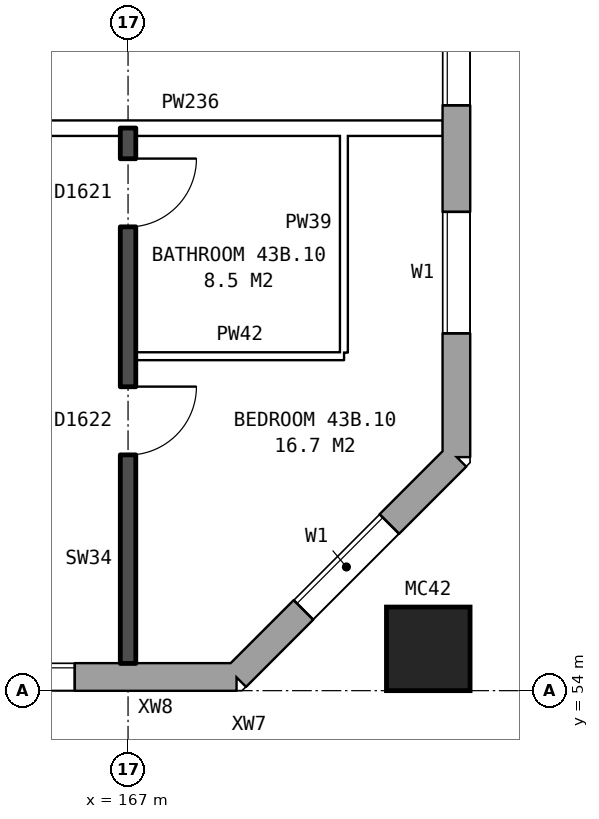
"""IFC4 building model, lengths in metres.
Left out: names, types, materials, properties, quantities, classifications, styles, units other than length and angle.
Written with IfcOpenShell. Run it as: python <this file> out.ifc"""

import sys

from ifc_helpers import new_model, si_unit, direction, frame, frame_2d, origin, origin_2d, place, context, subcontext, project, spatial, rectangle, hollow_rectangle, extrude, element, fill, save


model = new_model("IFC4")
c1 = context("Model", 3, precision=1e-05, world=origin(), true_north=direction((0.0, 1.0)))
c2 = subcontext(c1, "Body", "Model", "MODEL_VIEW")
j1 = project(units=[si_unit("LENGTHUNIT", "METRE"), si_unit("PLANEANGLEUNIT", "RADIAN")], contexts=[c1])
p1 = place(None, origin())
s1 = spatial("IfcSite", under=j1, at=p1, CompositionType="ELEMENT")
p2 = place(p1, origin())
s2 = spatial("IfcBuilding", under=s1, at=p2, CompositionType="ELEMENT")
p3 = place(p2, frame((0.0, 0.0, 154.7)))
s3 = spatial("IfcBuildingStorey", under=s2, at=p3, CompositionType="ELEMENT", Elevation=154.7)
p4 = place(p3, frame((170.95, 54.55, 0.0), z_axis=(0.0, 0.0, 1.0), x_axis=(1.0, 0.0, 0.0)))
e1 = element("IfcColumn", 1, at=p4, inside=s3, PredefinedType="COLUMN", context=c2, shape_type="SweptSolid", body=[
    extrude(hollow_rectangle(XDim=1.1, YDim=1.1, WallThickness=0.06, at=origin_2d()), origin(), (0.0, 0.0, 1.0), 3.1),
])
p5 = place(p3, frame((134.075, 54.18, 0.0), z_axis=(0.0, 0.0, 1.0), x_axis=(1.0, 0.0, 0.0)))
e2 = element("IfcWall", 2, at=p5, inside=s3, PredefinedType="STANDARD", context=c2, shape_type="SweptSolid", body=[
    extrude(rectangle(XDim=34.351, YDim=0.36, at=frame_2d((17.175, 0.0))), origin(), (0.0, 0.0, 1.0), 2.85),
])
p6 = place(p5, frame((0.625, 0.0, 0.8)))
e3 = element("IfcOpeningElement", 3, at=p6, cuts=e2, PredefinedType="OPENING", context=c2, shape_type="SweptSolid", body=[
    extrude(rectangle(XDim=1.6, YDim=1.8, at=frame_2d((0.8, 0.9))), frame((0.0, 0.19, 0.0), z_axis=(0.0, -1.0, 0.0), x_axis=(1.0, 0.0, 0.0)), (0.0, 0.0, 1.0), 0.38),
])
p7 = place(p5, frame((3.125, 0.0, 0.8)))
e4 = element("IfcOpeningElement", 4, at=p7, cuts=e2, PredefinedType="OPENING", context=c2, shape_type="SweptSolid", body=[
    extrude(rectangle(XDim=1.2, YDim=1.8, at=frame_2d((0.6, 0.9))), frame((0.0, 0.19, 0.0), z_axis=(0.0, -1.0, 0.0), x_axis=(1.0, 0.0, 0.0)), (0.0, 0.0, 1.0), 0.38),
])
p8 = place(p5, frame((4.625, 0.0, 1.7)))
e5 = element("IfcOpeningElement", 5, at=p8, cuts=e2, PredefinedType="OPENING", context=c2, shape_type="SweptSolid", body=[
    extrude(rectangle(XDim=0.8, YDim=0.9, at=frame_2d((0.4, 0.45))), frame((0.0, 0.19, 0.0), z_axis=(0.0, -1.0, 0.0), x_axis=(1.0, 0.0, 0.0)), (0.0, 0.0, 1.0), 0.38),
])
p9 = place(p5, frame((9.625, 0.0, 0.8)))
e6 = element("IfcOpeningElement", 6, at=p9, cuts=e2, PredefinedType="OPENING", context=c2, shape_type="SweptSolid", body=[
    extrude(rectangle(XDim=1.6, YDim=1.8, at=frame_2d((0.8, 0.9))), frame((0.0, 0.19, 0.0), z_axis=(0.0, -1.0, 0.0), x_axis=(1.0, 0.0, 0.0)), (0.0, 0.0, 1.0), 0.38),
])
p10 = place(p5, frame((12.625, 0.0, 0.8)))
e7 = element("IfcOpeningElement", 7, at=p10, cuts=e2, PredefinedType="OPENING", context=c2, shape_type="SweptSolid", body=[
    extrude(rectangle(XDim=1.6, YDim=1.8, at=frame_2d((0.8, 0.9))), frame((0.0, 0.19, 0.0), z_axis=(0.0, -1.0, 0.0), x_axis=(1.0, 0.0, 0.0)), (0.0, 0.0, 1.0), 0.38),
])
p11 = place(p5, frame((15.625, 0.0, 0.8)))
e8 = element("IfcOpeningElement", 8, at=p11, cuts=e2, PredefinedType="OPENING", context=c2, shape_type="SweptSolid", body=[
    extrude(rectangle(XDim=1.6, YDim=1.8, at=frame_2d((0.8, 0.9))), frame((0.0, 0.19, 0.0), z_axis=(0.0, -1.0, 0.0), x_axis=(1.0, 0.0, 0.0)), (0.0, 0.0, 1.0), 0.38),
])
p12 = place(p5, frame((18.625, 0.0, 0.8)))
e9 = element("IfcOpeningElement", 9, at=p12, cuts=e2, PredefinedType="OPENING", context=c2, shape_type="SweptSolid", body=[
    extrude(rectangle(XDim=1.6, YDim=1.8, at=frame_2d((0.8, 0.9))), frame((0.0, 0.19, 0.0), z_axis=(0.0, -1.0, 0.0), x_axis=(1.0, 0.0, 0.0)), (0.0, 0.0, 1.0), 0.38),
])
p13 = place(p5, frame((21.625, 0.0, 0.8)))
e10 = element("IfcOpeningElement", 10, at=p13, cuts=e2, PredefinedType="OPENING", context=c2, shape_type="SweptSolid", body=[
    extrude(rectangle(XDim=1.6, YDim=1.8, at=frame_2d((0.8, 0.9))), frame((0.0, 0.19, 0.0), z_axis=(0.0, -1.0, 0.0), x_axis=(1.0, 0.0, 0.0)), (0.0, 0.0, 1.0), 0.38),
])
p14 = place(p5, frame((24.625, 0.0, 0.8)))
e11 = element("IfcOpeningElement", 11, at=p14, cuts=e2, PredefinedType="OPENING", context=c2, shape_type="SweptSolid", body=[
    extrude(rectangle(XDim=1.6, YDim=1.8, at=frame_2d((0.8, 0.9))), frame((0.0, 0.19, 0.0), z_axis=(0.0, -1.0, 0.0), x_axis=(1.0, 0.0, 0.0)), (0.0, 0.0, 1.0), 0.38),
])
p15 = place(p5, frame((27.125, 0.0, 0.8)))
e12 = element("IfcOpeningElement", 12, at=p15, cuts=e2, PredefinedType="OPENING", context=c2, shape_type="SweptSolid", body=[
    extrude(rectangle(XDim=0.6, YDim=0.9, at=frame_2d((0.3, 0.45))), frame((0.0, 0.19, 0.0), z_axis=(0.0, -1.0, 0.0), x_axis=(1.0, 0.0, 0.0)), (0.0, 0.0, 1.0), 0.38),
])
p16 = place(p5, frame((30.625, 0.0, 0.8)))
e13 = element("IfcOpeningElement", 13, at=p16, cuts=e2, PredefinedType="OPENING", context=c2, shape_type="SweptSolid", body=[
    extrude(rectangle(XDim=1.6, YDim=1.8, at=frame_2d((0.8, 0.9))), frame((0.0, 0.19, 0.0), z_axis=(0.0, -1.0, 0.0), x_axis=(1.0, 0.0, 0.0)), (0.0, 0.0, 1.0), 0.38),
])
p17 = place(p5, frame((6.625, 0.0, 0.8)))
e14 = element("IfcOpeningElement", 14, at=p17, cuts=e2, PredefinedType="OPENING", context=c2, shape_type="SweptSolid", body=[
    extrude(rectangle(XDim=0.8, YDim=0.9, at=frame_2d((0.4, 0.45))), frame((0.0, 0.19, 0.0), z_axis=(0.0, -1.0, 0.0), x_axis=(1.0, 0.0, 0.0)), (0.0, 0.0, 1.0), 0.38),
])
p18 = place(p5, frame((7.725, 0.0, 0.8)))
e15 = element("IfcOpeningElement", 15, at=p18, cuts=e2, PredefinedType="OPENING", context=c2, shape_type="SweptSolid", body=[
    extrude(rectangle(XDim=1.0, YDim=1.8, at=frame_2d((0.5, 0.9))), frame((0.0, 0.19, 0.0), z_axis=(0.0, -1.0, 0.0), x_axis=(1.0, 0.0, 0.0)), (0.0, 0.0, 1.0), 0.38),
])
p19 = place(p5, frame((28.925, 0.0, 1.7)))
e16 = element("IfcOpeningElement", 16, at=p19, cuts=e2, PredefinedType="OPENING", context=c2, shape_type="SweptSolid", body=[
    extrude(rectangle(XDim=1.4, YDim=0.9, at=frame_2d((0.7, 0.45))), frame((0.0, 0.19, 0.0), z_axis=(0.0, -1.0, 0.0), x_axis=(1.0, 0.0, 0.0)), (0.0, 0.0, 1.0), 0.38),
])
p20 = place(p3, frame((168.425, 54.18, 0.0), z_axis=(0.0, 0.0, 1.0), x_axis=(0.707106781187, 0.707106781187, 0.0)))
e17 = element("IfcWall", 17, at=p20, inside=s3, PredefinedType="STANDARD", context=c2, shape_type="SweptSolid", body=[
    extrude(rectangle(XDim=4.094, YDim=0.36, at=frame_2d((2.047, 0.0))), origin(), (0.0, 0.0, 1.0), 2.85),
])
p21 = place(p20, frame((1.247, 0.0, 0.8)))
e18 = element("IfcOpeningElement", 18, at=p21, cuts=e17, PredefinedType="OPENING", context=c2, shape_type="SweptSolid", body=[
    extrude(rectangle(XDim=1.6, YDim=1.8, at=frame_2d((0.8, 0.9))), frame((0.0, 0.19, 0.0), z_axis=(0.0, -1.0, 0.0), x_axis=(1.0, 0.0, 0.0)), (0.0, 0.0, 1.0), 0.38),
])
p22 = place(p3, frame((171.32, 57.075, 0.0), z_axis=(0.0, 0.0, 1.0), x_axis=(0.0, 1.0, 0.0)))
e19 = element("IfcWall", 19, at=p22, inside=s3, PredefinedType="STANDARD", context=c2, shape_type="SweptSolid", body=[
    extrude(rectangle(XDim=25.851, YDim=0.36, at=frame_2d((12.925, 0.0))), origin(), (0.0, 0.0, 1.0), 2.85),
])
p23 = place(p22, frame((1.625, 0.0, 0.8)))
e20 = element("IfcOpeningElement", 20, at=p23, cuts=e19, PredefinedType="OPENING", context=c2, shape_type="SweptSolid", body=[
    extrude(rectangle(XDim=1.6, YDim=1.8, at=frame_2d((0.8, 0.9))), frame((0.0, 0.19, 0.0), z_axis=(0.0, -1.0, 0.0), x_axis=(1.0, 0.0, 0.0)), (0.0, 0.0, 1.0), 0.38),
])
p24 = place(p22, frame((4.625, 0.0, 0.8)))
e21 = element("IfcOpeningElement", 21, at=p24, cuts=e19, PredefinedType="OPENING", context=c2, shape_type="SweptSolid", body=[
    extrude(rectangle(XDim=1.6, YDim=1.8, at=frame_2d((0.8, 0.9))), frame((0.0, 0.19, 0.0), z_axis=(0.0, -1.0, 0.0), x_axis=(1.0, 0.0, 0.0)), (0.0, 0.0, 1.0), 0.38),
])
p25 = place(p22, frame((7.625, 0.0, 0.8)))
e22 = element("IfcOpeningElement", 22, at=p25, cuts=e19, PredefinedType="OPENING", context=c2, shape_type="SweptSolid", body=[
    extrude(rectangle(XDim=1.6, YDim=1.8, at=frame_2d((0.8, 0.9))), frame((0.0, 0.19, 0.0), z_axis=(0.0, -1.0, 0.0), x_axis=(1.0, 0.0, 0.0)), (0.0, 0.0, 1.0), 0.38),
])
p26 = place(p22, frame((6.525, 0.0, 0.8)))
e23 = element("IfcOpeningElement", 23, at=p26, cuts=e19, PredefinedType="OPENING", context=c2, shape_type="SweptSolid", body=[
    extrude(rectangle(XDim=0.8, YDim=1.8, at=frame_2d((0.4, 0.9))), frame((0.0, 0.19, 0.0), z_axis=(0.0, -1.0, 0.0), x_axis=(1.0, 0.0, 0.0)), (0.0, 0.0, 1.0), 0.38),
])
p27 = place(p22, frame((9.525, 0.0, 1.7)))
e24 = element("IfcOpeningElement", 24, at=p27, cuts=e19, PredefinedType="OPENING", context=c2, shape_type="SweptSolid", body=[
    extrude(rectangle(XDim=0.8, YDim=0.9, at=frame_2d((0.4, 0.45))), frame((0.0, 0.19, 0.0), z_axis=(0.0, -1.0, 0.0), x_axis=(1.0, 0.0, 0.0)), (0.0, 0.0, 1.0), 0.38),
])
p28 = place(p22, frame((16.625, 0.0, 0.8)))
e25 = element("IfcOpeningElement", 25, at=p28, cuts=e19, PredefinedType="OPENING", context=c2, shape_type="SweptSolid", body=[
    extrude(rectangle(XDim=1.6, YDim=1.8, at=frame_2d((0.8, 0.9))), frame((0.0, 0.19, 0.0), z_axis=(0.0, -1.0, 0.0), x_axis=(1.0, 0.0, 0.0)), (0.0, 0.0, 1.0), 0.38),
])
p29 = place(p22, frame((19.625, 0.0, 0.8)))
e26 = element("IfcOpeningElement", 26, at=p29, cuts=e19, PredefinedType="OPENING", context=c2, shape_type="SweptSolid", body=[
    extrude(rectangle(XDim=1.6, YDim=1.8, at=frame_2d((0.8, 0.9))), frame((0.0, 0.19, 0.0), z_axis=(0.0, -1.0, 0.0), x_axis=(1.0, 0.0, 0.0)), (0.0, 0.0, 1.0), 0.38),
])
p30 = place(p22, frame((22.625, 0.0, 0.8)))
e27 = element("IfcOpeningElement", 27, at=p30, cuts=e19, PredefinedType="OPENING", context=c2, shape_type="SweptSolid", body=[
    extrude(rectangle(XDim=1.6, YDim=1.8, at=frame_2d((0.8, 0.9))), frame((0.0, 0.19, 0.0), z_axis=(0.0, -1.0, 0.0), x_axis=(1.0, 0.0, 0.0)), (0.0, 0.0, 1.0), 0.38),
])
p31 = place(p22, frame((11.425, 0.0, 0.8)))
e28 = element("IfcOpeningElement", 28, at=p31, cuts=e19, PredefinedType="OPENING", context=c2, shape_type="SweptSolid", body=[
    extrude(rectangle(XDim=0.6, YDim=0.9, at=frame_2d((0.3, 0.45))), frame((0.0, 0.19, 0.0), z_axis=(0.0, -1.0, 0.0), x_axis=(1.0, 0.0, 0.0)), (0.0, 0.0, 1.0), 0.38),
])
p32 = place(p22, frame((12.325, 0.0, 0.8)))
e29 = element("IfcOpeningElement", 29, at=p32, cuts=e19, PredefinedType="OPENING", context=c2, shape_type="SweptSolid", body=[
    extrude(rectangle(XDim=1.2, YDim=1.8, at=frame_2d((0.6, 0.9))), frame((0.0, 0.19, 0.0), z_axis=(0.0, -1.0, 0.0), x_axis=(1.0, 0.0, 0.0)), (0.0, 0.0, 1.0), 0.38),
])
p33 = place(p22, frame((13.825, 0.0, 0.8)))
e30 = element("IfcOpeningElement", 30, at=p33, cuts=e19, PredefinedType="OPENING", context=c2, shape_type="SweptSolid", body=[
    extrude(rectangle(XDim=0.6, YDim=0.9, at=frame_2d((0.3, 0.45))), frame((0.0, 0.19, 0.0), z_axis=(0.0, -1.0, 0.0), x_axis=(1.0, 0.0, 0.0)), (0.0, 0.0, 1.0), 0.38),
])
p34 = place(p22, frame((15.475, 0.0, 1.7)))
e31 = element("IfcOpeningElement", 31, at=p34, cuts=e19, PredefinedType="OPENING", context=c2, shape_type="SweptSolid", body=[
    extrude(rectangle(XDim=0.6, YDim=0.9, at=frame_2d((0.3, 0.45))), frame((0.0, 0.19, 0.0), z_axis=(0.0, -1.0, 0.0), x_axis=(1.0, 0.0, 0.0)), (0.0, 0.0, 1.0), 0.38),
])
p35 = place(p22, frame((18.525, 0.0, 0.8)))
e32 = element("IfcOpeningElement", 32, at=p35, cuts=e19, PredefinedType="OPENING", context=c2, shape_type="SweptSolid", body=[
    extrude(rectangle(XDim=0.8, YDim=1.8, at=frame_2d((0.4, 0.9))), frame((0.0, 0.19, 0.0), z_axis=(0.0, -1.0, 0.0), x_axis=(1.0, 0.0, 0.0)), (0.0, 0.0, 1.0), 0.38),
])
p36 = place(p3, frame((167.1, 58.4, 0.0), z_axis=(0.0, 0.0, 1.0), x_axis=(1.0, 0.0, 0.0)))
e33 = element("IfcWall", 33, at=p36, inside=s3, PredefinedType="PARTITIONING", context=c2, shape_type="SweptSolid", body=[
    extrude(rectangle(XDim=2.74, YDim=0.1, at=frame_2d((1.37, 0.0))), origin(), (0.0, 0.0, 1.0), 2.85),
])
p37 = place(p3, frame((155.1, 61.4, 0.0), z_axis=(0.0, 0.0, 1.0), x_axis=(1.0, 0.0, 0.0)))
e34 = element("IfcWall", 34, at=p37, inside=s3, PredefinedType="PARTITIONING", context=c2, shape_type="SweptSolid", body=[
    extrude(rectangle(XDim=16.04, YDim=0.2, at=frame_2d((8.02, 0.0))), origin(), (0.0, 0.0, 1.0), 2.85),
])
p38 = place(p37, frame((1.45, 0.0, 0.0)))
e35 = element("IfcOpeningElement", 35, at=p38, cuts=e34, PredefinedType="OPENING", context=c2, shape_type="SweptSolid", body=[
    extrude(rectangle(XDim=1.0, YDim=2.1, at=frame_2d((0.5, 1.05))), frame((0.0, 0.11, 0.0), z_axis=(0.0, -1.0, 0.0), x_axis=(1.0, 0.0, 0.0)), (0.0, 0.0, 1.0), 0.22),
])
p39 = place(p37, frame((8.4, 0.0, 0.0)))
e36 = element("IfcOpeningElement", 36, at=p39, cuts=e34, PredefinedType="OPENING", context=c2, shape_type="SweptSolid", body=[
    extrude(rectangle(XDim=1.0, YDim=2.1, at=frame_2d((0.5, 1.05))), frame((0.0, 0.11, 0.0), z_axis=(0.0, -1.0, 0.0), x_axis=(1.0, 0.0, 0.0)), (0.0, 0.0, 1.0), 0.22),
])
p40 = place(p3, frame((167.0, 54.36, 0.0), z_axis=(0.0, 0.0, 1.0), x_axis=(0.0, 1.0, 0.0)))
e37 = element("IfcWall", 37, at=p40, inside=s3, PredefinedType="SOLIDWALL", context=c2, shape_type="SweptSolid", body=[
    extrude(rectangle(XDim=7.04, YDim=0.2, at=frame_2d((3.52, 0.0))), origin(), (0.0, 0.0, 1.0), 2.85),
])
p41 = place(p40, frame((2.74, 0.0, 0.0)))
e38 = element("IfcOpeningElement", 38, at=p41, cuts=e37, PredefinedType="OPENING", context=c2, shape_type="SweptSolid", body=[
    extrude(rectangle(XDim=0.9, YDim=2.1, at=frame_2d((0.45, 1.05))), frame((0.0, 0.11, 0.0), z_axis=(0.0, -1.0, 0.0), x_axis=(1.0, 0.0, 0.0)), (0.0, 0.0, 1.0), 0.22),
])
p42 = place(p40, frame((5.74, 0.0, 0.0)))
e39 = element("IfcOpeningElement", 39, at=p42, cuts=e37, PredefinedType="OPENING", context=c2, shape_type="SweptSolid", body=[
    extrude(rectangle(XDim=0.9, YDim=2.1, at=frame_2d((0.45, 1.05))), frame((0.0, 0.11, 0.0), z_axis=(0.0, -1.0, 0.0), x_axis=(1.0, 0.0, 0.0)), (0.0, 0.0, 1.0), 0.22),
])
p43 = place(p3, frame((169.84, 58.45, 0.0), z_axis=(0.0, 0.0, 1.0), x_axis=(0.0, 1.0, 0.0)))
e40 = element("IfcWall", 40, at=p43, inside=s3, PredefinedType="PARTITIONING", context=c2, shape_type="SweptSolid", body=[
    extrude(rectangle(XDim=2.85, YDim=0.1, at=frame_2d((1.425, 0.0))), origin(), (0.0, 0.0, 1.0), 2.85),
])
p44 = place(p16, origin())
e41 = element("IfcWindow", 41, at=p44, inside=s3, PartitioningType="SINGLE_PANEL", PredefinedType="WINDOW", context=c2, shape_type="SweptSolid", body=[
    extrude(rectangle(XDim=1.6, YDim=1.8, at=frame_2d((0.8, 0.9))), frame((0.0, 0.15, 0.0), z_axis=(0.0, -1.0, 0.0), x_axis=(1.0, 0.0, 0.0)), (0.0, 0.0, 1.0), 0.06),
])
fill(e13, e41)
p45 = place(p21, origin())
e42 = element("IfcWindow", 42, at=p45, inside=s3, PartitioningType="SINGLE_PANEL", PredefinedType="WINDOW", context=c2, shape_type="SweptSolid", body=[
    extrude(rectangle(XDim=1.6, YDim=1.8, at=frame_2d((0.8, 0.9))), frame((0.0, 0.15, 0.0), z_axis=(0.0, -1.0, 0.0), x_axis=(1.0, 0.0, 0.0)), (0.0, 0.0, 1.0), 0.06),
])
fill(e18, e42)
p46 = place(p23, origin())
e43 = element("IfcWindow", 43, at=p46, inside=s3, PartitioningType="SINGLE_PANEL", PredefinedType="WINDOW", context=c2, shape_type="SweptSolid", body=[
    extrude(rectangle(XDim=1.6, YDim=1.8, at=frame_2d((0.8, 0.9))), frame((0.0, 0.15, 0.0), z_axis=(0.0, -1.0, 0.0), x_axis=(1.0, 0.0, 0.0)), (0.0, 0.0, 1.0), 0.06),
])
fill(e20, e43)
p47 = place(p24, origin())
e44 = element("IfcWindow", 44, at=p47, inside=s3, PartitioningType="SINGLE_PANEL", PredefinedType="WINDOW", context=c2, shape_type="SweptSolid", body=[
    extrude(rectangle(XDim=1.6, YDim=1.8, at=frame_2d((0.8, 0.9))), frame((0.0, 0.15, 0.0), z_axis=(0.0, -1.0, 0.0), x_axis=(1.0, 0.0, 0.0)), (0.0, 0.0, 1.0), 0.06),
])
fill(e21, e44)
p48 = place(p41, frame((0.9, 0.0, 0.0), z_axis=(0.0, 0.0, 1.0), x_axis=(-1.0, 0.0, 0.0)))
e45 = element("IfcDoor", 45, at=p48, inside=s3, OperationType="SINGLE_SWING_LEFT", PredefinedType="DOOR", context=c2, shape_type="SweptSolid", body=[
    extrude(rectangle(XDim=0.9, YDim=2.1, at=frame_2d((0.45, 1.05))), frame((0.0, 0.025, 0.0), z_axis=(0.0, -1.0, 0.0), x_axis=(1.0, 0.0, 0.0)), (0.0, 0.0, 1.0), 0.05),
])
fill(e38, e45)
p49 = place(p42, frame((0.9, 0.0, 0.0), z_axis=(0.0, 0.0, 1.0), x_axis=(-1.0, 0.0, 0.0)))
e46 = element("IfcDoor", 46, at=p49, inside=s3, OperationType="SINGLE_SWING_LEFT", PredefinedType="DOOR", context=c2, shape_type="SweptSolid", body=[
    extrude(rectangle(XDim=0.9, YDim=2.1, at=frame_2d((0.45, 1.05))), frame((0.0, 0.025, 0.0), z_axis=(0.0, -1.0, 0.0), x_axis=(1.0, 0.0, 0.0)), (0.0, 0.0, 1.0), 0.05),
])
fill(e39, e46)
save(model, sys.argv[1])
